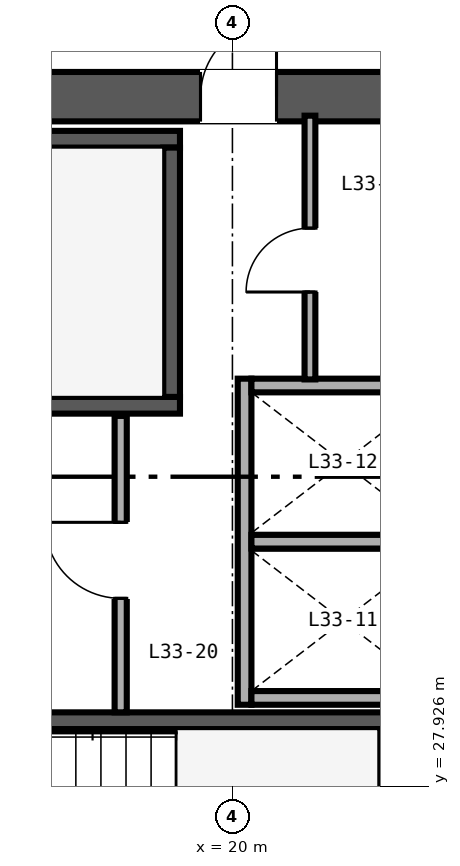
"""IFC4 building model, lengths in metres.
Left out: names, types, materials, properties, quantities, classifications, styles, units other than length and angle.
Written with IfcOpenShell. Run it as: python <this file> out.ifc"""

import sys

from ifc_helpers import new_model, si_unit, direction, frame, frame_2d, origin, place, context, subcontext, project, spatial, rectangle, extrude, source, transform, mapped, element, fill, save


model = new_model("IFC4")
c1 = context("Model", 3, precision=1e-05, world=origin(), true_north=direction((0.0, 1.0)))
c2 = subcontext(c1, "Body", "Model", "MODEL_VIEW")
j1 = project(units=[si_unit("LENGTHUNIT", "METRE"), si_unit("PLANEANGLEUNIT", "RADIAN")], contexts=[c1])
p1 = place(None, origin())
s1 = spatial("IfcSite", under=j1, at=p1, CompositionType="ELEMENT")
p2 = place(p1, origin())
s2 = spatial("IfcBuilding", under=s1, at=p2, CompositionType="ELEMENT")
p3 = place(p2, frame((0.0, 0.0, 133.2)))
s3 = spatial("IfcBuildingStorey", under=s2, at=p3, CompositionType="ELEMENT", Elevation=133.2)
p4 = place(p3, frame((10.675, 37.0, 0.0), z_axis=(0.0, 0.0, 1.0), x_axis=(1.0, 0.0, 0.0)))
e1 = element("IfcWall", 1, at=p4, inside=s3, PredefinedType="SHEAR", context=c2, shape_type="SweptSolid", body=[
    extrude(rectangle(XDim=12.65, YDim=0.65, at=frame_2d((6.325, 0.0))), origin(), (0.0, 0.0, 1.0), 3.36),
])
p5 = place(p4, frame((8.905, 0.0, 0.0)))
e2 = element("IfcOpeningElement", 2, at=p5, cuts=e1, PredefinedType="OPENING", context=c2, shape_type="SweptSolid", body=[
    extrude(rectangle(XDim=1.0, YDim=2.15, at=frame_2d((0.5, 1.075))), frame((0.0, 0.335, 0.0), z_axis=(0.0, -1.0, 0.0), x_axis=(1.0, 0.0, 0.0)), (0.0, 0.0, 1.0), 0.67),
])
p6 = place(p3, frame((11.325, 32.94, 0.0), z_axis=(0.0, 0.0, 1.0), x_axis=(1.0, 0.0, 0.0)))
e3 = element("IfcWall", 3, at=p6, inside=s3, PredefinedType="SHEAR", context=c2, shape_type="SweptSolid", body=[
    extrude(rectangle(XDim=7.985, YDim=0.22, at=frame_2d((3.993, 0.0))), origin(), (0.0, 0.0, 1.0), 3.4),
])
p7 = place(p6, frame((0.595, 0.0, 0.0)))
e4 = element("IfcOpeningElement", 4, at=p7, cuts=e3, PredefinedType="OPENING", context=c2, shape_type="SweptSolid", body=[
    extrude(rectangle(XDim=1.05, YDim=2.15, at=frame_2d((0.525, 1.075))), frame((0.0, 0.12, 0.0), z_axis=(0.0, -1.0, 0.0), x_axis=(1.0, 0.0, 0.0)), (0.0, 0.0, 1.0), 0.24),
])
p8 = place(p3, frame((11.325, 36.44, 0.0), z_axis=(0.0, 0.0, 1.0), x_axis=(1.0, 0.0, 0.0)))
e5 = element("IfcWall", 5, at=p8, inside=s3, PredefinedType="SHEAR", context=c2, shape_type="SweptSolid", body=[
    extrude(rectangle(XDim=7.985, YDim=0.22, at=frame_2d((3.993, 0.0))), origin(), (0.0, 0.0, 1.0), 3.4),
])
p9 = place(p3, frame((19.2, 33.05, 0.0), z_axis=(0.0, 0.0, 1.0), x_axis=(0.0, 1.0, 0.0)))
e6 = element("IfcWall", 6, at=p9, inside=s3, PredefinedType="SHEAR", context=c2, shape_type="SweptSolid", body=[
    extrude(rectangle(XDim=3.28, YDim=0.22, at=frame_2d((1.64, 0.0))), origin(), (0.0, 0.0, 1.0), 3.4),
])
p10 = place(p3, frame((14.18, 28.79, 0.0), z_axis=(0.0, 0.0, 1.0), x_axis=(1.0, 0.0, 0.0)))
e7 = element("IfcWall", 7, at=p10, inside=s3, PredefinedType="SHEAR", context=c2, shape_type="SweptSolid", body=[
    extrude(rectangle(XDim=8.495, YDim=0.22, at=frame_2d((4.248, 0.0))), origin(), (0.0, 0.0, 1.0), 3.4),
])
p11 = place(p3, frame((22.03, 25.4, 0.0), z_axis=(0.0, 0.0, 1.0), x_axis=(0.0, 1.0, 0.0)))
e8 = element("IfcWall", 8, at=p11, inside=s3, PredefinedType="SHEAR", context=c2, shape_type="SweptSolid", body=[
    extrude(rectangle(XDim=3.28, YDim=0.22, at=frame_2d((1.64, 0.0))), origin(), (0.0, 0.0, 1.0), 3.4),
])
p12 = place(p3, frame((20.16, 29.0, 0.0), z_axis=(0.0, 0.0, 1.0), x_axis=(0.0, 1.0, 0.0)))
e9 = element("IfcWall", 9, at=p12, inside=s3, PredefinedType="SOLIDWALL", context=c2, shape_type="SweptSolid", body=[
    extrude(rectangle(XDim=4.29, YDim=0.18, at=frame_2d((2.145, 0.0))), origin(), (0.0, 0.0, 1.0), 3.36),
])
p13 = place(p3, frame((20.25, 29.09, 0.0), z_axis=(0.0, 0.0, 1.0), x_axis=(1.0, 0.0, 0.0)))
e10 = element("IfcWall", 10, at=p13, inside=s3, PredefinedType="SOLIDWALL", context=c2, shape_type="SweptSolid", body=[
    extrude(rectangle(XDim=2.36, YDim=0.18, at=frame_2d((1.18, 0.0))), origin(), (0.0, 0.0, 1.0), 3.36),
])
p14 = place(p3, frame((20.25, 33.2, 0.0), z_axis=(0.0, 0.0, 1.0), x_axis=(1.0, 0.0, 0.0)))
e11 = element("IfcWall", 11, at=p14, inside=s3, PredefinedType="SOLIDWALL", context=c2, shape_type="SweptSolid", body=[
    extrude(rectangle(XDim=2.5, YDim=0.18, at=frame_2d((1.25, 0.0))), origin(), (0.0, 0.0, 1.0), 3.36),
])
p15 = place(p3, frame((20.25, 31.145, 0.0), z_axis=(0.0, 0.0, 1.0), x_axis=(1.0, 0.0, 0.0)))
e12 = element("IfcWall", 12, at=p15, inside=s3, PredefinedType="SOLIDWALL", context=c2, shape_type="SweptSolid", body=[
    extrude(rectangle(XDim=2.36, YDim=0.18, at=frame_2d((1.18, 0.0))), origin(), (0.0, 0.0, 1.0), 3.36),
])
p16 = place(p3, frame((18.53, 28.9, 0.0), z_axis=(0.0, 0.0, 1.0), x_axis=(0.0, 1.0, 0.0)))
e13 = element("IfcWall", 13, at=p16, inside=s3, PredefinedType="PARTITIONING", context=c2, shape_type="SweptSolid", body=[
    extrude(rectangle(XDim=3.9, YDim=0.16, at=frame_2d((1.95, 0.0))), origin(), (0.0, 0.0, 1.0), 3.36),
])
p17 = place(p16, frame((1.5, 0.0, 0.0)))
e14 = element("IfcOpeningElement", 14, at=p17, cuts=e13, PredefinedType="OPENING", context=c2, shape_type="SweptSolid", body=[
    extrude(rectangle(XDim=1.0, YDim=2.15, at=frame_2d((0.5, 1.075))), frame((0.0, 0.09, 0.0), z_axis=(0.0, -1.0, 0.0), x_axis=(1.0, 0.0, 0.0)), (0.0, 0.0, 1.0), 0.18),
])
p18 = place(p3, frame((21.02, 33.28, 0.0), z_axis=(0.0, 0.0, 1.0), x_axis=(0.0, 1.0, 0.0)))
e15 = element("IfcWall", 15, at=p18, inside=s3, PredefinedType="PARTITIONING", context=c2, shape_type="SweptSolid", body=[
    extrude(rectangle(XDim=3.47, YDim=0.142, at=frame_2d((1.735, 0.0))), origin(), (0.0, 0.0, 1.0), 3.36),
])
p19 = place(p18, frame((1.15, 0.0, 0.0)))
e16 = element("IfcOpeningElement", 16, at=p19, cuts=e15, PredefinedType="OPENING", context=c2, shape_type="SweptSolid", body=[
    extrude(rectangle(XDim=0.84, YDim=2.1, at=frame_2d((0.42, 1.05))), frame((0.0, 0.081, 0.0), z_axis=(0.0, -1.0, 0.0), x_axis=(1.0, 0.0, 0.0)), (0.0, 0.0, 1.0), 0.162),
])
m1 = source(origin(), c2, "Body", "SweptSolid", [
    extrude(rectangle(XDim=1.0, YDim=2.15, at=frame_2d((0.5, 1.075))), frame((0.0, 0.025, 0.0), z_axis=(0.0, -1.0, 0.0), x_axis=(1.0, 0.0, 0.0)), (0.0, 0.0, 1.0), 0.05),
])
p20 = place(p17, origin())
e17 = element("IfcDoor", 17, at=p20, inside=s3, OperationType="SINGLE_SWING_RIGHT", PredefinedType="DOOR", context=c2, shape_type="MappedRepresentation", body=[
    mapped(m1, transform((0.0, 0.0, 0.0), scale=1.0)),
])
fill(e14, e17)
m2 = source(origin(), c2, "Body", "SweptSolid", [
    extrude(rectangle(XDim=0.84, YDim=2.1, at=frame_2d((0.42, 1.05))), frame((0.0, 0.025, 0.0), z_axis=(0.0, -1.0, 0.0), x_axis=(1.0, 0.0, 0.0)), (0.0, 0.0, 1.0), 0.05),
])
p21 = place(p19, origin())
e18 = element("IfcDoor", 18, at=p21, inside=s3, OperationType="SINGLE_SWING_LEFT", PredefinedType="DOOR", context=c2, shape_type="MappedRepresentation", body=[
    mapped(m2, transform((0.0, 0.0, 0.0), scale=1.0)),
])
fill(e16, e18)
p22 = place(p5, origin())
e19 = element("IfcDoor", 19, at=p22, inside=s3, OperationType="SINGLE_SWING_RIGHT", PredefinedType="DOOR", context=c2, shape_type="MappedRepresentation", body=[
    mapped(m1, transform((0.0, 0.0, 0.0), scale=1.0)),
])
fill(e2, e19)
save(model, sys.argv[1])
